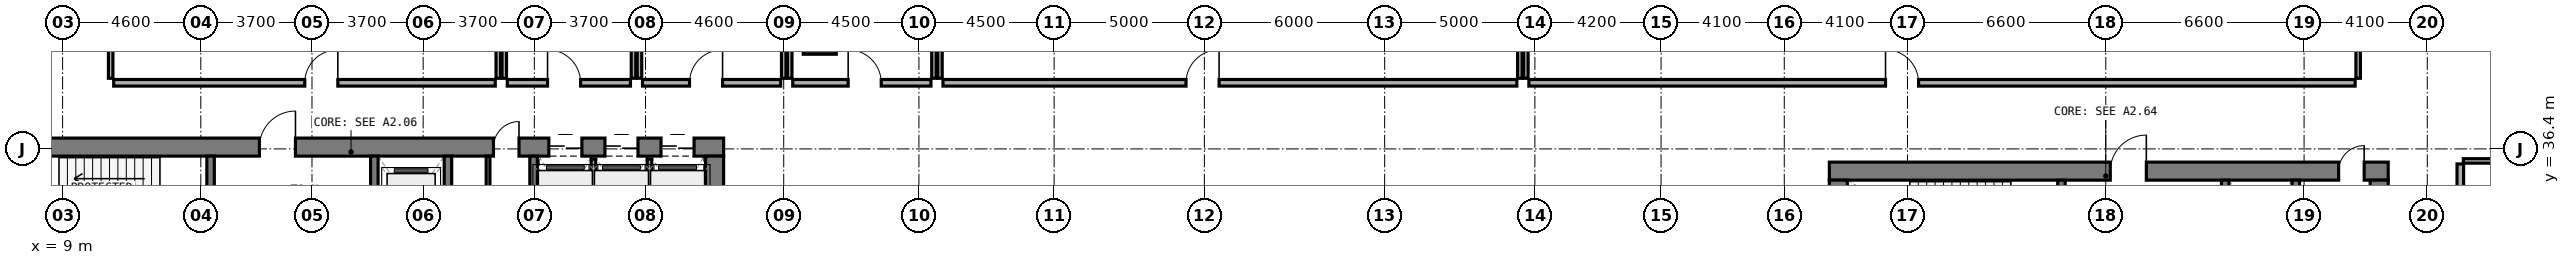
"""IFC4 building model, lengths in metres.
Left out: names, types, materials, properties, quantities, classifications, styles, units other than length and angle.
Written with IfcOpenShell. Run it as: python <this file> out.ifc"""

import sys

from ifc_helpers import new_model, si_unit, direction, frame, frame_2d, origin, origin_2d, place, context, subcontext, project, spatial, rectangle, extrude, element, fill, save


model = new_model("IFC4")
c1 = context("Model", 3, precision=1e-05, world=origin(), true_north=direction((0.0, 1.0)))
c2 = subcontext(c1, "Body", "Model", "MODEL_VIEW")
j1 = project(units=[si_unit("LENGTHUNIT", "METRE"), si_unit("PLANEANGLEUNIT", "RADIAN")], contexts=[c1])
p1 = place(None, origin())
s1 = spatial("IfcSite", under=j1, at=p1, CompositionType="ELEMENT")
p2 = place(p1, origin())
s2 = spatial("IfcBuilding", under=s1, at=p2, CompositionType="ELEMENT")
p3 = place(p2, frame((0.0, 0.0, 15.0)))
s3 = spatial("IfcBuildingStorey", under=s2, at=p3, CompositionType="ELEMENT", Elevation=15.0)
p4 = place(p3, frame((6.2, 36.46, 0.0), z_axis=(0.0, 0.0, 1.0), x_axis=(1.0, 0.0, 0.0)))
e1 = element("IfcWall", 1, at=p4, inside=s3, PredefinedType="SHEAR", context=c2, shape_type="SweptSolid", body=[
    extrude(rectangle(XDim=24.8, YDim=0.6, at=frame_2d((12.4, 0.0))), origin(), (0.0, 0.0, 1.0), 4.5),
])
p5 = place(p4, frame((9.35, 0.0, 0.0)))
e2 = element("IfcOpeningElement", 2, at=p5, cuts=e1, PredefinedType="OPENING", context=c2, shape_type="SweptSolid", body=[
    extrude(rectangle(XDim=1.2, YDim=2.15, at=frame_2d((0.6, 1.075))), frame((0.0, 0.31, 0.0), z_axis=(0.0, -1.0, 0.0), x_axis=(1.0, 0.0, 0.0)), (0.0, 0.0, 1.0), 0.62),
])
p6 = place(p4, frame((17.14, 0.0, 0.0)))
e3 = element("IfcOpeningElement", 3, at=p6, cuts=e1, PredefinedType="OPENING", context=c2, shape_type="SweptSolid", body=[
    extrude(rectangle(XDim=0.85, YDim=2.1, at=frame_2d((0.425, 1.05))), frame((0.0, 0.31, 0.0), z_axis=(0.0, -1.0, 0.0), x_axis=(1.0, 0.0, 0.0)), (0.0, 0.0, 1.0), 0.62),
])
p7 = place(p4, frame((18.983, 0.0, 0.0)))
e4 = element("IfcOpeningElement", 4, at=p7, cuts=e1, PredefinedType="OPENING", context=c2, shape_type="SweptSolid", body=[
    extrude(rectangle(XDim=1.1, YDim=2.15, at=frame_2d((0.55, 1.075))), frame((0.0, 0.31, 0.0), z_axis=(0.0, -1.0, 0.0), x_axis=(1.0, 0.0, 0.0)), (0.0, 0.0, 1.0), 0.62),
])
p8 = place(p4, frame((20.85, 0.0, 0.0)))
e5 = element("IfcOpeningElement", 5, at=p8, cuts=e1, PredefinedType="OPENING", context=c2, shape_type="SweptSolid", body=[
    extrude(rectangle(XDim=1.1, YDim=2.15, at=frame_2d((0.55, 1.075))), frame((0.0, 0.31, 0.0), z_axis=(0.0, -1.0, 0.0), x_axis=(1.0, 0.0, 0.0)), (0.0, 0.0, 1.0), 0.62),
])
p9 = place(p4, frame((22.716, 0.0, 0.0)))
e6 = element("IfcOpeningElement", 6, at=p9, cuts=e1, PredefinedType="OPENING", context=c2, shape_type="SweptSolid", body=[
    extrude(rectangle(XDim=1.1, YDim=2.15, at=frame_2d((0.55, 1.075))), frame((0.0, 0.31, 0.0), z_axis=(0.0, -1.0, 0.0), x_axis=(1.0, 0.0, 0.0)), (0.0, 0.0, 1.0), 0.62),
])
p10 = place(p3, frame((30.7, 33.0, 0.0), z_axis=(0.0, 0.0, 1.0), x_axis=(0.0, 1.0, 0.0)))
e7 = element("IfcWall", 7, at=p10, inside=s3, PredefinedType="SHEAR", context=c2, shape_type="SweptSolid", body=[
    extrude(rectangle(XDim=3.16, YDim=0.6, at=frame_2d((1.58, 0.0))), origin(), (0.0, 0.0, 1.0), 4.5),
])
p11 = place(p3, frame((13.925, 33.0, 0.0), z_axis=(0.0, 0.0, 1.0), x_axis=(0.0, 1.0, 0.0)))
e8 = element("IfcWall", 8, at=p11, inside=s3, PredefinedType="STANDARD", context=c2, shape_type="SweptSolid", body=[
    extrude(rectangle(XDim=3.16, YDim=0.25, at=frame_2d((1.58, 0.0))), origin(), (0.0, 0.0, 1.0), 4.1),
])
p12 = place(p11, frame((0.98, 0.0, 0.0)))
e9 = element("IfcOpeningElement", 9, at=p12, cuts=e8, PredefinedType="OPENING", context=c2, shape_type="SweptSolid", body=[
    extrude(rectangle(XDim=1.1, YDim=2.15, at=frame_2d((0.55, 1.075))), frame((0.0, 0.135, 0.0), z_axis=(0.0, -1.0, 0.0), x_axis=(1.0, 0.0, 0.0)), (0.0, 0.0, 1.0), 0.27),
])
p13 = place(p3, frame((19.375, 33.0, 0.0), z_axis=(0.0, 0.0, 1.0), x_axis=(0.0, 1.0, 0.0)))
e10 = element("IfcWall", 10, at=p13, inside=s3, PredefinedType="STANDARD", context=c2, shape_type="SweptSolid", body=[
    extrude(rectangle(XDim=3.16, YDim=0.25, at=frame_2d((1.58, 0.0))), origin(), (0.0, 0.0, 1.0), 4.1),
])
p14 = place(p13, frame((0.98, 0.0, 0.0)))
e11 = element("IfcOpeningElement", 11, at=p14, cuts=e10, PredefinedType="OPENING", context=c2, shape_type="SweptSolid", body=[
    extrude(rectangle(XDim=1.1, YDim=2.15, at=frame_2d((0.55, 1.075))), frame((0.0, 0.135, 0.0), z_axis=(0.0, -1.0, 0.0), x_axis=(1.0, 0.0, 0.0)), (0.0, 0.0, 1.0), 0.27),
])
for number, where, z_axis, x_axis in (
    (12, (21.825, 33.0, 0.0), (0.0, 0.0, 1.0), (0.0, 1.0, 0.0)),
    (13, (24.675, 33.0, 0.0), (0.0, 0.0, 1.0), (0.0, 1.0, 0.0)),
):
    element("IfcWall", number, at=place(p3, frame(where, z_axis=z_axis, x_axis=x_axis)), inside=s3, PredefinedType="STANDARD", context=c2, shape_type="SweptSolid", body=[
        extrude(rectangle(XDim=3.16, YDim=0.25, at=frame_2d((1.58, 0.0))), origin(), (0.0, 0.0, 1.0), 4.1),
    ])
p15 = place(p3, frame((67.8, 35.66, 0.0), z_axis=(0.0, 0.0, 1.0), x_axis=(1.0, 0.0, 0.0)))
e14 = element("IfcWall", 14, at=p15, inside=s3, PredefinedType="SHEAR", context=c2, shape_type="SweptSolid", body=[
    extrude(rectangle(XDim=18.6, YDim=0.6, at=frame_2d((9.3, 0.0))), origin(), (0.0, 0.0, 1.0), 4.5),
])
p16 = place(p15, frame((9.35, 0.0, 0.0)))
e15 = element("IfcOpeningElement", 15, at=p16, cuts=e14, PredefinedType="OPENING", context=c2, shape_type="SweptSolid", body=[
    extrude(rectangle(XDim=1.2, YDim=2.15, at=frame_2d((0.6, 1.075))), frame((0.0, 0.31, 0.0), z_axis=(0.0, -1.0, 0.0), x_axis=(1.0, 0.0, 0.0)), (0.0, 0.0, 1.0), 0.62),
])
p17 = place(p15, frame((16.95, 0.0, 0.0)))
e16 = element("IfcOpeningElement", 16, at=p17, cuts=e14, PredefinedType="OPENING", context=c2, shape_type="SweptSolid", body=[
    extrude(rectangle(XDim=0.85, YDim=2.1, at=frame_2d((0.425, 1.05))), frame((0.0, 0.31, 0.0), z_axis=(0.0, -1.0, 0.0), x_axis=(1.0, 0.0, 0.0)), (0.0, 0.0, 1.0), 0.62),
])
for number, where, z_axis, x_axis in (
    (17, (68.1, 32.2, 0.0), (0.0, 0.0, 1.0), (0.0, 1.0, 0.0)),
    (18, (86.1, 32.2, 0.0), (0.0, 0.0, 1.0), (0.0, 1.0, 0.0)),
):
    element("IfcWall", number, at=place(p3, frame(where, z_axis=z_axis, x_axis=x_axis)), inside=s3, PredefinedType="SHEAR", context=c2, shape_type="SweptSolid", body=[
        extrude(rectangle(XDim=3.16, YDim=0.6, at=frame_2d((1.58, 0.0))), origin(), (0.0, 0.0, 1.0), 4.5),
    ])
p18 = place(p3, frame((75.525, 32.2, 0.0), z_axis=(0.0, 0.0, 1.0), x_axis=(0.0, 1.0, 0.0)))
e19 = element("IfcWall", 19, at=p18, inside=s3, PredefinedType="STANDARD", context=c2, shape_type="SweptSolid", body=[
    extrude(rectangle(XDim=3.16, YDim=0.25, at=frame_2d((1.58, 0.0))), origin(), (0.0, 0.0, 1.0), 4.1),
])
p19 = place(p18, frame((0.98, 0.0, 0.0)))
e20 = element("IfcOpeningElement", 20, at=p19, cuts=e19, PredefinedType="OPENING", context=c2, shape_type="SweptSolid", body=[
    extrude(rectangle(XDim=1.1, YDim=2.15, at=frame_2d((0.55, 1.075))), frame((0.0, 0.135, 0.0), z_axis=(0.0, -1.0, 0.0), x_axis=(1.0, 0.0, 0.0)), (0.0, 0.0, 1.0), 0.27),
])
p20 = place(p3, frame((80.975, 32.2, 0.0), z_axis=(0.0, 0.0, 1.0), x_axis=(0.0, 1.0, 0.0)))
e21 = element("IfcWall", 21, at=p20, inside=s3, PredefinedType="STANDARD", context=c2, shape_type="SweptSolid", body=[
    extrude(rectangle(XDim=3.16, YDim=0.25, at=frame_2d((1.58, 0.0))), origin(), (0.0, 0.0, 1.0), 4.1),
])
p21 = place(p20, frame((0.98, 0.0, 0.0)))
e22 = element("IfcOpeningElement", 22, at=p21, cuts=e21, PredefinedType="OPENING", context=c2, shape_type="SweptSolid", body=[
    extrude(rectangle(XDim=1.1, YDim=2.15, at=frame_2d((0.55, 1.075))), frame((0.0, 0.135, 0.0), z_axis=(0.0, -1.0, 0.0), x_axis=(1.0, 0.0, 0.0)), (0.0, 0.0, 1.0), 0.27),
])
p22 = place(p3, frame((83.325, 32.2, 0.0), z_axis=(0.0, 0.0, 1.0), x_axis=(0.0, 1.0, 0.0)))
e23 = element("IfcWall", 23, at=p22, inside=s3, PredefinedType="STANDARD", context=c2, shape_type="SweptSolid", body=[
    extrude(rectangle(XDim=3.16, YDim=0.25, at=frame_2d((1.58, 0.0))), origin(), (0.0, 0.0, 1.0), 4.1),
])
p23 = place(p3, frame((34.2, 40.2, 0.0), z_axis=(0.0, 0.0, 1.0), x_axis=(1.0, 0.0, 0.0)))
e24 = element("IfcColumn", 24, at=p23, inside=s3, PredefinedType="COLUMN", context=c2, shape_type="SweptSolid", body=[
    extrude(rectangle(XDim=1.1, YDim=1.3, at=origin_2d()), origin(), (0.0, 0.0, 1.0), 4.5),
])
p24 = place(p3, frame((23.16, 34.82, 0.0), z_axis=(0.0, 0.0, 1.0), x_axis=(0.0, 1.0, 0.0)))
e25 = element("IfcWall", 25, at=p24, inside=s3, PredefinedType="PARTITIONING", context=c2, shape_type="SweptSolid", body=[
    extrude(rectangle(XDim=1.34, YDim=0.125, at=frame_2d((0.67, 0.0))), origin(), (0.0, 0.0, 1.0), 4.1),
])
p25 = place(p3, frame((26.667, 33.1, 0.0), z_axis=(0.0, 0.0, 1.0), x_axis=(0.0, 1.0, 0.0)))
e26 = element("IfcWall", 26, at=p25, inside=s3, PredefinedType="PARTITIONING", context=c2, shape_type="SweptSolid", body=[
    extrude(rectangle(XDim=2.96, YDim=0.15, at=frame_2d((1.48, 0.0))), origin(), (0.0, 0.0, 1.0), 4.1),
])
p26 = place(p3, frame((28.533, 33.1, 0.0), z_axis=(0.0, 0.0, 1.0), x_axis=(0.0, 1.0, 0.0)))
e27 = element("IfcWall", 27, at=p26, inside=s3, PredefinedType="PARTITIONING", context=c2, shape_type="SweptSolid", body=[
    extrude(rectangle(XDim=2.96, YDim=0.15, at=frame_2d((1.48, 0.0))), origin(), (0.0, 0.0, 1.0), 3.175),
])
for number, where, z_axis, x_axis in (
    (28, (10.6, 38.75, 0.0), (0.0, 0.0, 1.0), (0.0, 1.0, 0.0)),
    (29, (23.5, 38.75, 0.0), (0.0, 0.0, 1.0), (0.0, 1.0, 0.0)),
):
    element("IfcWall", number, at=place(p3, frame(where, z_axis=z_axis, x_axis=x_axis)), inside=s3, PredefinedType="PARTITIONING", context=c2, shape_type="SweptSolid", body=[
        extrude(rectangle(XDim=4.8, YDim=0.15, at=frame_2d((2.4, 0.0))), origin(), (0.0, 0.0, 1.0), 3.625),
    ])
p27 = place(p3, frame((10.7, 38.6, 0.0), z_axis=(0.0, 0.0, 1.0), x_axis=(1.0, 0.0, 0.0)))
e30 = element("IfcWall", 30, at=p27, inside=s3, PredefinedType="SOLIDWALL", context=c2, shape_type="SweptSolid", body=[
    extrude(rectangle(XDim=12.7, YDim=0.22, at=frame_2d((6.35, 0.0))), origin(), (0.0, 0.0, 1.0), 4.1),
])
p28 = place(p27, frame((6.36, 0.0, 0.0)))
e31 = element("IfcOpeningElement", 31, at=p28, cuts=e30, PredefinedType="OPENING", context=c2, shape_type="SweptSolid", body=[
    extrude(rectangle(XDim=1.1, YDim=2.1, at=frame_2d((0.55, 1.05))), frame((0.0, 0.12, 0.0), z_axis=(0.0, -1.0, 0.0), x_axis=(1.0, 0.0, 0.0)), (0.0, 0.0, 1.0), 0.24),
])
for number, where, z_axis, x_axis in (
    (32, (23.7, 38.75, 0.0), (0.0, 0.0, 1.0), (0.0, 1.0, 0.0)),
    (33, (28.0, 38.75, 0.0), (0.0, 0.0, 1.0), (0.0, 1.0, 0.0)),
):
    element("IfcWall", number, at=place(p3, frame(where, z_axis=z_axis, x_axis=x_axis)), inside=s3, PredefinedType="PARTITIONING", context=c2, shape_type="SweptSolid", body=[
        extrude(rectangle(XDim=4.8, YDim=0.15, at=frame_2d((2.4, 0.0))), origin(), (0.0, 0.0, 1.0), 3.625),
    ])
p29 = place(p3, frame((23.8, 38.6, 0.0), z_axis=(0.0, 0.0, 1.0), x_axis=(1.0, 0.0, 0.0)))
e34 = element("IfcWall", 34, at=p29, inside=s3, PredefinedType="SOLIDWALL", context=c2, shape_type="SweptSolid", body=[
    extrude(rectangle(XDim=4.1, YDim=0.22, at=frame_2d((2.05, 0.0))), origin(), (0.0, 0.0, 1.0), 3.175),
])
p30 = place(p29, frame((1.34, 0.0, 0.0)))
e35 = element("IfcOpeningElement", 35, at=p30, cuts=e34, PredefinedType="OPENING", context=c2, shape_type="SweptSolid", body=[
    extrude(rectangle(XDim=1.1, YDim=2.1, at=frame_2d((0.55, 1.05))), frame((0.0, 0.12, 0.0), z_axis=(0.0, -1.0, 0.0), x_axis=(1.0, 0.0, 0.0)), (0.0, 0.0, 1.0), 0.24),
])
for number, where, z_axis, x_axis in (
    (36, (28.2, 38.75, 0.0), (0.0, 0.0, 1.0), (0.0, 1.0, 0.0)),
    (37, (33.0, 38.75, 0.0), (0.0, 0.0, 1.0), (0.0, 1.0, 0.0)),
):
    element("IfcWall", number, at=place(p3, frame(where, z_axis=z_axis, x_axis=x_axis)), inside=s3, PredefinedType="PARTITIONING", context=c2, shape_type="SweptSolid", body=[
        extrude(rectangle(XDim=4.8, YDim=0.15, at=frame_2d((2.4, 0.0))), origin(), (0.0, 0.0, 1.0), 3.625),
    ])
p31 = place(p3, frame((28.3, 38.6, 0.0), z_axis=(0.0, 0.0, 1.0), x_axis=(1.0, 0.0, 0.0)))
e38 = element("IfcWall", 38, at=p31, inside=s3, PredefinedType="SOLIDWALL", context=c2, shape_type="SweptSolid", body=[
    extrude(rectangle(XDim=4.6, YDim=0.22, at=frame_2d((2.3, 0.0))), origin(), (0.0, 0.0, 1.0), 4.1),
])
p32 = place(p31, frame((1.565, 0.0, 0.0)))
e39 = element("IfcOpeningElement", 39, at=p32, cuts=e38, PredefinedType="OPENING", context=c2, shape_type="SweptSolid", body=[
    extrude(rectangle(XDim=1.1, YDim=2.1, at=frame_2d((0.55, 1.05))), frame((0.0, 0.12, 0.0), z_axis=(0.0, -1.0, 0.0), x_axis=(1.0, 0.0, 0.0)), (0.0, 0.0, 1.0), 0.24),
])
p33 = place(p3, frame((33.2, 38.75, 0.0), z_axis=(0.0, 0.0, 1.0), x_axis=(0.0, 1.0, 0.0)))
e40 = element("IfcWall", 40, at=p33, inside=s3, PredefinedType="PARTITIONING", context=c2, shape_type="SweptSolid", body=[
    extrude(rectangle(XDim=4.8, YDim=0.15, at=frame_2d((2.4, 0.0))), origin(), (0.0, 0.0, 1.0), 3.625),
])
p34 = place(p3, frame((38.0, 38.75, 0.0), z_axis=(0.0, 0.0, 1.0), x_axis=(0.0, 1.0, 0.0)))
e41 = element("IfcWall", 41, at=p34, inside=s3, PredefinedType="PARTITIONING", context=c2, shape_type="SweptSolid", body=[
    extrude(rectangle(XDim=4.8, YDim=0.15, at=frame_2d((2.4, 0.0))), origin(), (0.0, 0.0, 1.0), 4.1),
])
p35 = place(p3, frame((33.3, 38.6, 0.0), z_axis=(0.0, 0.0, 1.0), x_axis=(1.0, 0.0, 0.0)))
e42 = element("IfcWall", 42, at=p35, inside=s3, PredefinedType="SOLIDWALL", context=c2, shape_type="SweptSolid", body=[
    extrude(rectangle(XDim=4.6, YDim=0.22, at=frame_2d((2.3, 0.0))), origin(), (0.0, 0.0, 1.0), 3.625),
])
p36 = place(p35, frame((1.845, 0.0, 0.0)))
e43 = element("IfcOpeningElement", 43, at=p36, cuts=e42, PredefinedType="OPENING", context=c2, shape_type="SweptSolid", body=[
    extrude(rectangle(XDim=1.1, YDim=2.1, at=frame_2d((0.55, 1.05))), frame((0.0, 0.12, 0.0), z_axis=(0.0, -1.0, 0.0), x_axis=(1.0, 0.0, 0.0)), (0.0, 0.0, 1.0), 0.24),
])
p37 = place(p3, frame((38.2, 38.75, 0.0), z_axis=(0.0, 0.0, 1.0), x_axis=(0.0, 1.0, 0.0)))
e44 = element("IfcWall", 44, at=p37, inside=s3, PredefinedType="PARTITIONING", context=c2, shape_type="SweptSolid", body=[
    extrude(rectangle(XDim=4.8, YDim=0.15, at=frame_2d((2.4, 0.0))), origin(), (0.0, 0.0, 1.0), 4.1),
])
p38 = place(p3, frame((57.5, 38.75, 0.0), z_axis=(0.0, 0.0, 1.0), x_axis=(0.0, 1.0, 0.0)))
e45 = element("IfcWall", 45, at=p38, inside=s3, PredefinedType="PARTITIONING", context=c2, shape_type="SweptSolid", body=[
    extrude(rectangle(XDim=4.8, YDim=0.15, at=frame_2d((2.4, 0.0))), origin(), (0.0, 0.0, 1.0), 3.275),
])
p39 = place(p3, frame((38.3, 38.6, 0.0), z_axis=(0.0, 0.0, 1.0), x_axis=(1.0, 0.0, 0.0)))
e46 = element("IfcWall", 46, at=p39, inside=s3, PredefinedType="SOLIDWALL", context=c2, shape_type="SweptSolid", body=[
    extrude(rectangle(XDim=19.1, YDim=0.22, at=frame_2d((9.55, 0.0))), origin(), (0.0, 0.0, 1.0), 3.375),
])
p40 = place(p39, frame((8.09, 0.0, 0.0)))
e47 = element("IfcOpeningElement", 47, at=p40, cuts=e46, PredefinedType="OPENING", context=c2, shape_type="SweptSolid", body=[
    extrude(rectangle(XDim=1.1, YDim=2.1, at=frame_2d((0.55, 1.05))), frame((0.0, 0.12, 0.0), z_axis=(0.0, -1.0, 0.0), x_axis=(1.0, 0.0, 0.0)), (0.0, 0.0, 1.0), 0.24),
])
p41 = place(p3, frame((57.7, 38.75, 0.0), z_axis=(0.0, 0.0, 1.0), x_axis=(0.0, 1.0, 0.0)))
e48 = element("IfcWall", 48, at=p41, inside=s3, PredefinedType="PARTITIONING", context=c2, shape_type="SweptSolid", body=[
    extrude(rectangle(XDim=4.8, YDim=0.15, at=frame_2d((2.4, 0.0))), origin(), (0.0, 0.0, 1.0), 3.375),
])
p42 = place(p3, frame((85.4, 38.75, 0.0), z_axis=(0.0, 0.0, 1.0), x_axis=(0.0, 1.0, 0.0)))
e49 = element("IfcWall", 49, at=p42, inside=s3, PredefinedType="PARTITIONING", context=c2, shape_type="SweptSolid", body=[
    extrude(rectangle(XDim=4.8, YDim=0.15, at=frame_2d((2.4, 0.0))), origin(), (0.0, 0.0, 1.0), 3.715),
])
p43 = place(p3, frame((57.8, 38.6, 0.0), z_axis=(0.0, 0.0, 1.0), x_axis=(1.0, 0.0, 0.0)))
e50 = element("IfcWall", 50, at=p43, inside=s3, PredefinedType="SOLIDWALL", context=c2, shape_type="SweptSolid", body=[
    extrude(rectangle(XDim=27.5, YDim=0.22, at=frame_2d((13.75, 0.0))), origin(), (0.0, 0.0, 1.0), 3.575),
])
p44 = place(p43, frame((11.87, 0.0, 0.0)))
e51 = element("IfcOpeningElement", 51, at=p44, cuts=e50, PredefinedType="OPENING", context=c2, shape_type="SweptSolid", body=[
    extrude(rectangle(XDim=1.1, YDim=2.1, at=frame_2d((0.55, 1.05))), frame((0.0, 0.12, 0.0), z_axis=(0.0, -1.0, 0.0), x_axis=(1.0, 0.0, 0.0)), (0.0, 0.0, 1.0), 0.24),
])
p45 = place(p3, frame((88.9, 36.0, 0.0), z_axis=(0.0, 0.0, 1.0), x_axis=(1.0, 0.0, 0.0)))
e52 = element("IfcWall", 52, at=p45, inside=s3, PredefinedType="PARTITIONING", context=c2, shape_type="SweptSolid", body=[
    extrude(rectangle(XDim=6.65, YDim=0.15, at=frame_2d((3.325, 0.0))), origin(), (0.0, 0.0, 1.0), 3.715),
])
p46 = place(p3, frame((88.8, 25.3, 0.0), z_axis=(0.0, 0.0, 1.0), x_axis=(0.0, 1.0, 0.0)))
e53 = element("IfcWall", 53, at=p46, inside=s3, PredefinedType="SOLIDWALL", context=c2, shape_type="SweptSolid", body=[
    extrude(rectangle(XDim=10.6, YDim=0.22, at=frame_2d((5.3, 0.0))), origin(), (0.0, 0.0, 1.0), 3.575),
])
p47 = place(p46, frame((4.265, 0.0, 0.0)))
e54 = element("IfcOpeningElement", 54, at=p47, cuts=e53, PredefinedType="OPENING", context=c2, shape_type="SweptSolid", body=[
    extrude(rectangle(XDim=1.1, YDim=2.1, at=frame_2d((0.55, 1.05))), frame((0.0, 0.12, 0.0), z_axis=(0.0, -1.0, 0.0), x_axis=(1.0, 0.0, 0.0)), (0.0, 0.0, 1.0), 0.24),
])
p48 = place(p5, origin())
e55 = element("IfcDoor", 55, at=p48, inside=s3, OperationType="SINGLE_SWING_RIGHT", PredefinedType="DOOR", context=c2, shape_type="SweptSolid", body=[
    extrude(rectangle(XDim=1.2, YDim=2.15, at=frame_2d((0.6, 1.075))), frame((0.0, 0.025, 0.0), z_axis=(0.0, -1.0, 0.0), x_axis=(1.0, 0.0, 0.0)), (0.0, 0.0, 1.0), 0.05),
])
fill(e2, e55)
p49 = place(p6, origin())
e56 = element("IfcDoor", 56, at=p49, inside=s3, OperationType="SINGLE_SWING_RIGHT", PredefinedType="DOOR", context=c2, shape_type="SweptSolid", body=[
    extrude(rectangle(XDim=0.85, YDim=2.1, at=frame_2d((0.425, 1.05))), frame((0.0, 0.025, 0.0), z_axis=(0.0, -1.0, 0.0), x_axis=(1.0, 0.0, 0.0)), (0.0, 0.0, 1.0), 0.05),
])
fill(e3, e56)
p50 = place(p7, origin())
e57 = element("IfcDoor", 57, at=p50, inside=s3, OperationType="DOUBLE_DOOR_SLIDING", PredefinedType="DOOR", context=c2, shape_type="SweptSolid", body=[
    extrude(rectangle(XDim=1.1, YDim=2.15, at=frame_2d((0.55, 1.075))), frame((0.0, 0.025, 0.0), z_axis=(0.0, -1.0, 0.0), x_axis=(1.0, 0.0, 0.0)), (0.0, 0.0, 1.0), 0.05),
])
fill(e4, e57)
p51 = place(p8, origin())
e58 = element("IfcDoor", 58, at=p51, inside=s3, OperationType="DOUBLE_DOOR_SLIDING", PredefinedType="DOOR", context=c2, shape_type="SweptSolid", body=[
    extrude(rectangle(XDim=1.1, YDim=2.15, at=frame_2d((0.55, 1.075))), frame((0.0, 0.025, 0.0), z_axis=(0.0, -1.0, 0.0), x_axis=(1.0, 0.0, 0.0)), (0.0, 0.0, 1.0), 0.05),
])
fill(e5, e58)
p52 = place(p9, origin())
e59 = element("IfcDoor", 59, at=p52, inside=s3, OperationType="DOUBLE_DOOR_SLIDING", PredefinedType="DOOR", context=c2, shape_type="SweptSolid", body=[
    extrude(rectangle(XDim=1.1, YDim=2.15, at=frame_2d((0.55, 1.075))), frame((0.0, 0.025, 0.0), z_axis=(0.0, -1.0, 0.0), x_axis=(1.0, 0.0, 0.0)), (0.0, 0.0, 1.0), 0.05),
])
fill(e6, e59)
p53 = place(p16, origin())
e60 = element("IfcDoor", 60, at=p53, inside=s3, OperationType="SINGLE_SWING_RIGHT", PredefinedType="DOOR", context=c2, shape_type="SweptSolid", body=[
    extrude(rectangle(XDim=1.2, YDim=2.15, at=frame_2d((0.6, 1.075))), frame((0.0, 0.025, 0.0), z_axis=(0.0, -1.0, 0.0), x_axis=(1.0, 0.0, 0.0)), (0.0, 0.0, 1.0), 0.05),
])
fill(e15, e60)
p54 = place(p17, origin())
e61 = element("IfcDoor", 61, at=p54, inside=s3, OperationType="SINGLE_SWING_RIGHT", PredefinedType="DOOR", context=c2, shape_type="SweptSolid", body=[
    extrude(rectangle(XDim=0.85, YDim=2.1, at=frame_2d((0.425, 1.05))), frame((0.0, 0.025, 0.0), z_axis=(0.0, -1.0, 0.0), x_axis=(1.0, 0.0, 0.0)), (0.0, 0.0, 1.0), 0.05),
])
fill(e16, e61)
p55 = place(p28, origin())
e62 = element("IfcDoor", 62, at=p55, inside=s3, OperationType="SINGLE_SWING_RIGHT", PredefinedType="DOOR", context=c2, shape_type="SweptSolid", body=[
    extrude(rectangle(XDim=1.1, YDim=2.1, at=frame_2d((0.55, 1.05))), frame((0.0, 0.025, 0.0), z_axis=(0.0, -1.0, 0.0), x_axis=(1.0, 0.0, 0.0)), (0.0, 0.0, 1.0), 0.05),
])
fill(e31, e62)
p56 = place(p30, origin())
e63 = element("IfcDoor", 63, at=p56, inside=s3, OperationType="SINGLE_SWING_LEFT", PredefinedType="DOOR", context=c2, shape_type="SweptSolid", body=[
    extrude(rectangle(XDim=1.1, YDim=2.1, at=frame_2d((0.55, 1.05))), frame((0.0, 0.025, 0.0), z_axis=(0.0, -1.0, 0.0), x_axis=(1.0, 0.0, 0.0)), (0.0, 0.0, 1.0), 0.05),
])
fill(e35, e63)
p57 = place(p32, origin())
e64 = element("IfcDoor", 64, at=p57, inside=s3, OperationType="SINGLE_SWING_RIGHT", PredefinedType="DOOR", context=c2, shape_type="SweptSolid", body=[
    extrude(rectangle(XDim=1.1, YDim=2.1, at=frame_2d((0.55, 1.05))), frame((0.0, 0.025, 0.0), z_axis=(0.0, -1.0, 0.0), x_axis=(1.0, 0.0, 0.0)), (0.0, 0.0, 1.0), 0.05),
])
fill(e39, e64)
p58 = place(p36, origin())
e65 = element("IfcDoor", 65, at=p58, inside=s3, OperationType="SINGLE_SWING_LEFT", PredefinedType="DOOR", context=c2, shape_type="SweptSolid", body=[
    extrude(rectangle(XDim=1.1, YDim=2.1, at=frame_2d((0.55, 1.05))), frame((0.0, 0.025, 0.0), z_axis=(0.0, -1.0, 0.0), x_axis=(1.0, 0.0, 0.0)), (0.0, 0.0, 1.0), 0.05),
])
fill(e43, e65)
p59 = place(p40, origin())
e66 = element("IfcDoor", 66, at=p59, inside=s3, OperationType="SINGLE_SWING_RIGHT", PredefinedType="DOOR", context=c2, shape_type="SweptSolid", body=[
    extrude(rectangle(XDim=1.1, YDim=2.1, at=frame_2d((0.55, 1.05))), frame((0.0, 0.025, 0.0), z_axis=(0.0, -1.0, 0.0), x_axis=(1.0, 0.0, 0.0)), (0.0, 0.0, 1.0), 0.05),
])
fill(e47, e66)
p60 = place(p44, origin())
e67 = element("IfcDoor", 67, at=p60, inside=s3, OperationType="SINGLE_SWING_LEFT", PredefinedType="DOOR", context=c2, shape_type="SweptSolid", body=[
    extrude(rectangle(XDim=1.1, YDim=2.1, at=frame_2d((0.55, 1.05))), frame((0.0, 0.025, 0.0), z_axis=(0.0, -1.0, 0.0), x_axis=(1.0, 0.0, 0.0)), (0.0, 0.0, 1.0), 0.05),
])
fill(e51, e67)
save(model, sys.argv[1])
